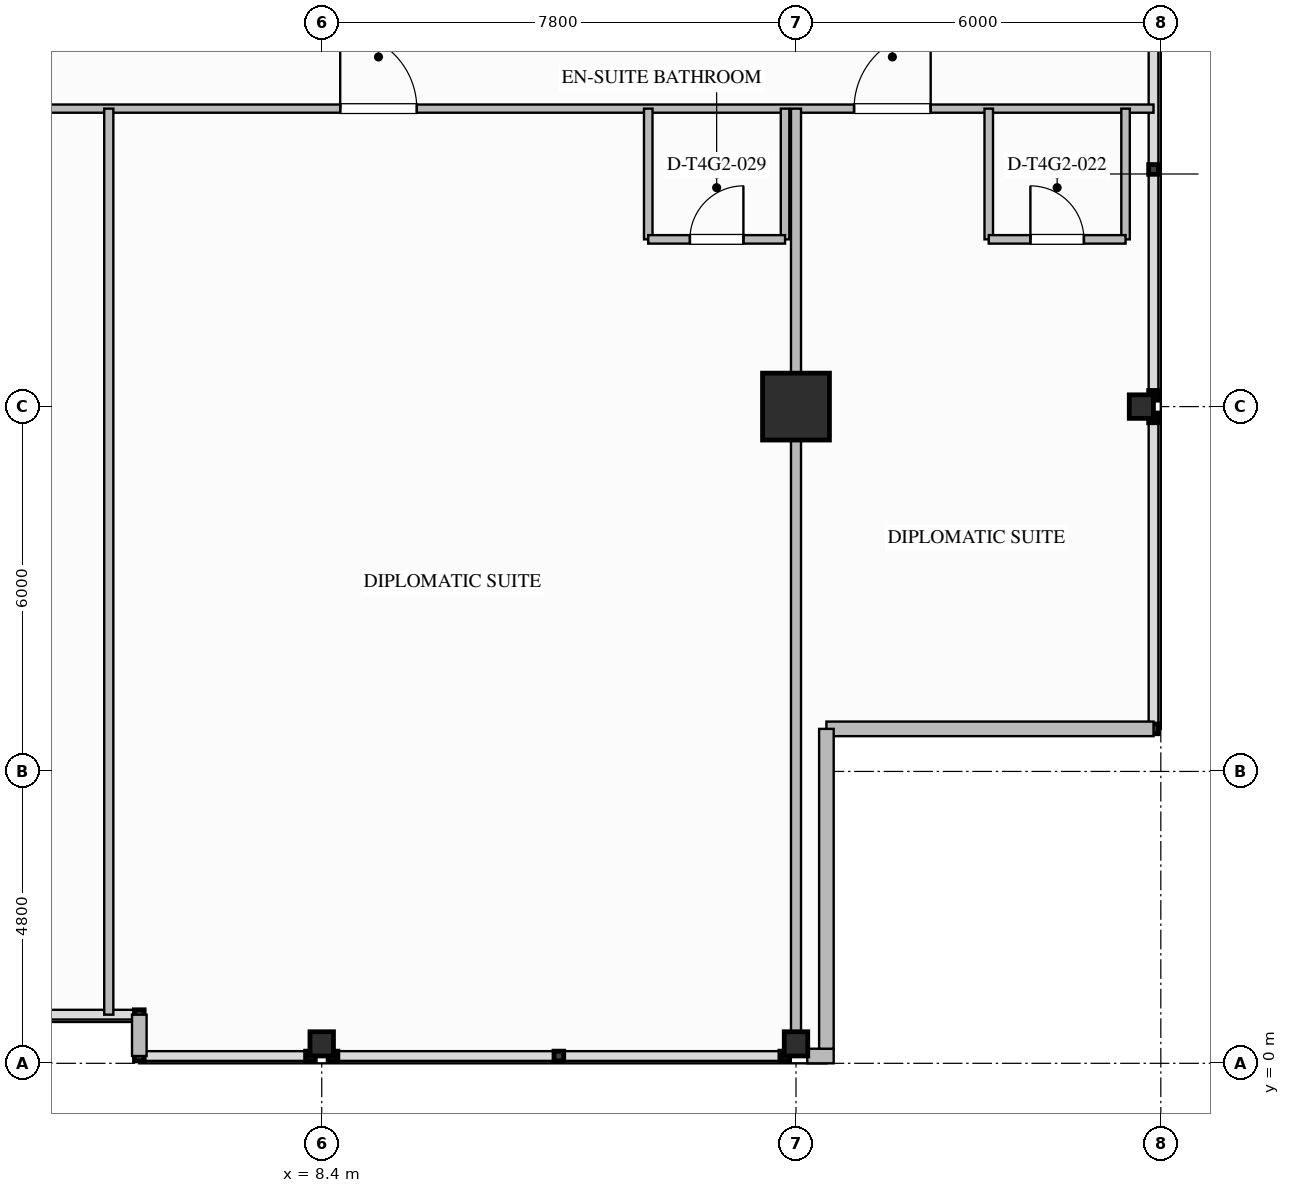
"""IFC4 building model, lengths in metres.
Left out: names, types, materials, properties, quantities, classifications, styles, units other than length and angle.
Written with IfcOpenShell. Run it as: python <this file> out.ifc"""

import sys

from ifc_helpers import new_model, si_unit, direction, frame, frame_2d, origin, origin_2d, place, context, subcontext, project, spatial, rectangle, i_section, extrude, element, fill, save


model = new_model("IFC4")
c1 = context("Model", 3, precision=1e-05, world=origin(), true_north=direction((0.0, 1.0)))
c2 = subcontext(c1, "Body", "Model", "MODEL_VIEW")
j1 = project(units=[si_unit("LENGTHUNIT", "METRE"), si_unit("PLANEANGLEUNIT", "RADIAN")], contexts=[c1])
p1 = place(None, origin())
s1 = spatial("IfcSite", under=j1, at=p1, CompositionType="ELEMENT")
p2 = place(p1, origin())
s2 = spatial("IfcBuilding", under=s1, at=p2, CompositionType="ELEMENT")
p3 = place(p2, frame((0.0, 0.0, 215.9)))
s3 = spatial("IfcBuildingStorey", under=s2, at=p3, CompositionType="ELEMENT", Elevation=215.9)
p4 = place(p3, frame((16.2, 10.8, 0.0), z_axis=(0.0, 0.0, 1.0), x_axis=(1.0, 0.0, 0.0)))
e1 = element("IfcColumn", 1, at=p4, inside=s3, PredefinedType="COLUMN", context=c2, shape_type="SweptSolid", body=[
    extrude(rectangle(XDim=1.1, YDim=1.1, at=origin_2d()), origin(), (0.0, 0.0, 1.0), 3.6),
])
for number, where, z_axis, x_axis in (
    (2, (21.88, 10.8, 0.0), (0.0, 0.0, 1.0), (1.0, 0.0, 0.0)),
    (3, (8.4, 0.32, 0.0), (0.0, 0.0, 1.0), (0.0, 1.0, 0.0)),
    (4, (16.2, 0.32, 0.0), (0.0, 0.0, 1.0), (0.0, 1.0, 0.0)),
):
    element("IfcColumn", number, at=place(p3, frame(where, z_axis=z_axis, x_axis=x_axis)), inside=s3, PredefinedType="COLUMN", context=c2, shape_type="SweptSolid", body=[
        extrude(i_section(OverallWidth=0.397, OverallDepth=0.387, WebThickness=0.021, FlangeThickness=0.033, FilletRadius=0.025, at=origin_2d()), origin(), (0.0, 0.0, 1.0), 3.597),
    ])
p5 = place(p3, frame((16.82, 0.12, 0.0), z_axis=(0.0, 0.0, 1.0), x_axis=(-1.0, 0.0, 0.0)))
e5 = element("IfcWall", 5, at=p5, inside=s3, PredefinedType="STANDARD", context=c2, shape_type="SweptSolid", body=[
    extrude(rectangle(XDim=0.435, YDim=0.24, at=frame_2d((0.217, 0.0))), origin(), (0.0, 0.0, 1.0), 3.34),
])
p6 = place(p3, frame((22.08, 5.5, 0.0), z_axis=(0.0, 0.0, 1.0), x_axis=(-1.0, 0.0, 0.0)))
e6 = element("IfcWall", 6, at=p6, inside=s3, PredefinedType="STANDARD", context=c2, shape_type="SweptSolid", body=[
    extrude(rectangle(XDim=5.38, YDim=0.24, at=frame_2d((2.69, 0.0))), origin(), (0.0, 0.0, 1.0), 3.34),
])
p7 = place(p3, frame((16.7, 5.5, 0.0), z_axis=(0.0, 0.0, 1.0), x_axis=(0.0, -1.0, 0.0)))
e7 = element("IfcWall", 7, at=p7, inside=s3, PredefinedType="STANDARD", context=c2, shape_type="SweptSolid", body=[
    extrude(rectangle(XDim=5.26, YDim=0.24, at=frame_2d((2.63, 0.0))), origin(), (0.0, 0.0, 1.0), 3.34),
])
p8 = place(p3, frame((5.4, 0.12, 0.0), z_axis=(0.0, 0.0, 1.0), x_axis=(0.0, 1.0, 0.0)))
e8 = element("IfcWall", 8, at=p8, inside=s3, PredefinedType="STANDARD", context=c2, shape_type="SweptSolid", body=[
    extrude(rectangle(XDim=0.68, YDim=0.24, at=frame_2d((0.34, 0.0))), origin(), (0.0, 0.0, 1.0), 3.34),
])
p9 = place(p3, frame((-16.2, 15.7, 0.0), z_axis=(0.0, 0.0, 1.0), x_axis=(1.0, 0.0, 0.0)))
e9 = element("IfcWall", 9, at=p9, inside=s3, PredefinedType="PARTITIONING", context=c2, shape_type="SweptSolid", body=[
    extrude(rectangle(XDim=38.28, YDim=0.135, at=frame_2d((19.14, 0.0))), origin(), (0.0, 0.0, 1.0), 3.34),
])
p10 = place(p9, frame((33.355, 0.0, 0.0)))
e10 = element("IfcOpeningElement", 10, at=p10, cuts=e9, PredefinedType="OPENING", context=c2, shape_type="SweptSolid", body=[
    extrude(rectangle(XDim=1.26, YDim=2.2, at=frame_2d((0.63, 1.1))), frame((0.0, 0.077, 0.0), z_axis=(0.0, -1.0, 0.0), x_axis=(1.0, 0.0, 0.0)), (0.0, 0.0, 1.0), 0.155),
])
p11 = place(p9, frame((4.183, 0.0, 0.0)))
e11 = element("IfcOpeningElement", 11, at=p11, cuts=e9, PredefinedType="OPENING", context=c2, shape_type="SweptSolid", body=[
    extrude(rectangle(XDim=1.26, YDim=2.2, at=frame_2d((0.63, 1.1))), frame((0.0, 0.077, 0.0), z_axis=(0.0, -1.0, 0.0), x_axis=(1.0, 0.0, 0.0)), (0.0, 0.0, 1.0), 0.155),
])
p12 = place(p9, frame((15.947, 0.0, 0.0)))
e12 = element("IfcOpeningElement", 12, at=p12, cuts=e9, PredefinedType="OPENING", context=c2, shape_type="SweptSolid", body=[
    extrude(rectangle(XDim=1.26, YDim=2.2, at=frame_2d((0.63, 1.1))), frame((0.0, 0.077, 0.0), z_axis=(0.0, -1.0, 0.0), x_axis=(1.0, 0.0, 0.0)), (0.0, 0.0, 1.0), 0.155),
])
p13 = place(p9, frame((24.904, 0.0, 0.0)))
e13 = element("IfcOpeningElement", 13, at=p13, cuts=e9, PredefinedType="OPENING", context=c2, shape_type="SweptSolid", body=[
    extrude(rectangle(XDim=1.26, YDim=2.2, at=frame_2d((0.63, 1.1))), frame((0.0, 0.077, 0.0), z_axis=(0.0, -1.0, 0.0), x_axis=(1.0, 0.0, 0.0)), (0.0, 0.0, 1.0), 0.155),
])
p14 = place(p3, frame((16.2, 0.12, 0.0), z_axis=(0.0, 0.0, 1.0), x_axis=(0.0, 1.0, 0.0)))
e14 = element("IfcWall", 14, at=p14, inside=s3, PredefinedType="PARTITIONING", context=c2, shape_type="SweptSolid", body=[
    extrude(rectangle(XDim=15.58, YDim=0.165, at=frame_2d((7.79, 0.0))), origin(), (0.0, 0.0, 1.0), 2.714),
])
for number, where, z_axis, x_axis in (
    (15, (19.37, 15.7, 0.0), (0.0, 0.0, 1.0), (0.0, -1.0, 0.0)),
    (16, (21.62, 15.7, 0.0), (0.0, 0.0, 1.0), (0.0, -1.0, 0.0)),
):
    element("IfcWall", number, at=place(p3, frame(where, z_axis=z_axis, x_axis=x_axis)), inside=s3, PredefinedType="PLUMBINGWALL", context=c2, shape_type="SweptSolid", body=[
        extrude(rectangle(XDim=2.15, YDim=0.14, at=frame_2d((1.075, 0.0))), origin(), (0.0, 0.0, 1.0), 3.34),
    ])
p15 = place(p3, frame((19.37, 13.55, 0.0), z_axis=(0.0, 0.0, 1.0), x_axis=(1.0, 0.0, 0.0)))
e17 = element("IfcWall", 17, at=p15, inside=s3, PredefinedType="PLUMBINGWALL", context=c2, shape_type="SweptSolid", body=[
    extrude(rectangle(XDim=2.25, YDim=0.14, at=frame_2d((1.125, 0.0))), origin(), (0.0, 0.0, 1.0), 3.34),
])
p16 = place(p15, frame((0.685, 0.0, 0.0)))
e18 = element("IfcOpeningElement", 18, at=p16, cuts=e17, PredefinedType="OPENING", context=c2, shape_type="SweptSolid", body=[
    extrude(rectangle(XDim=0.88, YDim=2.1, at=frame_2d((0.44, 1.05))), frame((0.0, 0.08, 0.0), z_axis=(0.0, -1.0, 0.0), x_axis=(1.0, 0.0, 0.0)), (0.0, 0.0, 1.0), 0.16),
])
p17 = place(p3, frame((4.898, 0.8, 0.0), z_axis=(0.0, 0.0, 1.0), x_axis=(0.0, 1.0, 0.0)))
e19 = element("IfcWall", 19, at=p17, inside=s3, PredefinedType="PARTITIONING", context=c2, shape_type="SweptSolid", body=[
    extrude(rectangle(XDim=14.9, YDim=0.15, at=frame_2d((7.45, 0.0))), origin(), (0.0, 0.0, 1.0), 3.34),
])
p18 = place(p3, frame((13.77, 15.7, 0.0), z_axis=(0.0, 0.0, 1.0), x_axis=(0.0, -1.0, 0.0)))
e20 = element("IfcWall", 20, at=p18, inside=s3, PredefinedType="PLUMBINGWALL", context=c2, shape_type="SweptSolid", body=[
    extrude(rectangle(XDim=2.15, YDim=0.14, at=frame_2d((1.075, 0.0))), origin(), (0.0, 0.0, 1.0), 3.34),
])
p19 = place(p3, frame((16.02, 15.7, 0.0), z_axis=(0.0, 0.0, 1.0), x_axis=(0.0, -1.0, 0.0)))
e21 = element("IfcWall", 21, at=p19, inside=s3, PredefinedType="PLUMBINGWALL", context=c2, shape_type="SweptSolid", body=[
    extrude(rectangle(XDim=2.15, YDim=0.14, at=frame_2d((1.075, 0.0))), origin(), (0.0, 0.0, 1.0), 2.714),
])
p20 = place(p3, frame((13.77, 13.55, 0.0), z_axis=(0.0, 0.0, 1.0), x_axis=(1.0, 0.0, 0.0)))
e22 = element("IfcWall", 22, at=p20, inside=s3, PredefinedType="PLUMBINGWALL", context=c2, shape_type="SweptSolid", body=[
    extrude(rectangle(XDim=2.25, YDim=0.14, at=frame_2d((1.125, 0.0))), origin(), (0.0, 0.0, 1.0), 3.34),
])
p21 = place(p20, frame((0.685, 0.0, 0.0)))
e23 = element("IfcOpeningElement", 23, at=p21, cuts=e22, PredefinedType="OPENING", context=c2, shape_type="SweptSolid", body=[
    extrude(rectangle(XDim=0.88, YDim=2.1, at=frame_2d((0.44, 1.05))), frame((0.0, 0.08, 0.0), z_axis=(0.0, -1.0, 0.0), x_axis=(1.0, 0.0, 0.0)), (0.0, 0.0, 1.0), 0.16),
])
p22 = place(p16, origin())
e24 = element("IfcDoor", 24, at=p22, inside=s3, OperationType="SINGLE_SWING_LEFT", PredefinedType="DOOR", context=c2, shape_type="SweptSolid", body=[
    extrude(rectangle(XDim=0.88, YDim=2.1, at=frame_2d((0.44, 1.05))), frame((0.0, 0.025, 0.0), z_axis=(0.0, -1.0, 0.0), x_axis=(1.0, 0.0, 0.0)), (0.0, 0.0, 1.0), 0.05),
])
fill(e18, e24)
p23 = place(p10, origin())
e25 = element("IfcDoor", 25, at=p23, inside=s3, OperationType="SINGLE_SWING_RIGHT", PredefinedType="DOOR", context=c2, shape_type="SweptSolid", body=[
    extrude(rectangle(XDim=1.26, YDim=2.2, at=frame_2d((0.63, 1.1))), frame((0.0, 0.025, 0.0), z_axis=(0.0, -1.0, 0.0), x_axis=(1.0, 0.0, 0.0)), (0.0, 0.0, 1.0), 0.05),
])
fill(e10, e25)
p24 = place(p21, origin())
e26 = element("IfcDoor", 26, at=p24, inside=s3, OperationType="SINGLE_SWING_RIGHT", PredefinedType="DOOR", context=c2, shape_type="SweptSolid", body=[
    extrude(rectangle(XDim=0.88, YDim=2.1, at=frame_2d((0.44, 1.05))), frame((0.0, 0.025, 0.0), z_axis=(0.0, -1.0, 0.0), x_axis=(1.0, 0.0, 0.0)), (0.0, 0.0, 1.0), 0.05),
])
fill(e23, e26)
p25 = place(p13, origin())
e27 = element("IfcDoor", 27, at=p25, inside=s3, OperationType="SINGLE_SWING_LEFT", PredefinedType="DOOR", context=c2, shape_type="SweptSolid", body=[
    extrude(rectangle(XDim=1.26, YDim=2.2, at=frame_2d((0.63, 1.1))), frame((0.0, 0.025, 0.0), z_axis=(0.0, -1.0, 0.0), x_axis=(1.0, 0.0, 0.0)), (0.0, 0.0, 1.0), 0.05),
])
fill(e13, e27)
save(model, sys.argv[1])
